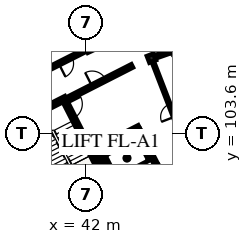
"""IFC4 building model, lengths in metres.
Left out: names, types, materials, properties, quantities, classifications, styles, units other than length and angle.
Written with IfcOpenShell. Run it as: python <this file> out.ifc"""

import sys

from ifc_helpers import new_model, si_unit, direction, frame, frame_2d, origin, origin_2d, place, context, subcontext, project, spatial, rectangle, extrude, element, fill, save


model = new_model("IFC4")
c1 = context("Model", 3, precision=1e-05, world=origin(), true_north=direction((0.0, 1.0)))
c2 = subcontext(c1, "Body", "Model", "MODEL_VIEW")
j1 = project(units=[si_unit("LENGTHUNIT", "METRE"), si_unit("PLANEANGLEUNIT", "RADIAN")], contexts=[c1])
p1 = place(None, origin())
s1 = spatial("IfcSite", under=j1, at=p1, CompositionType="ELEMENT")
p2 = place(p1, origin())
s2 = spatial("IfcBuilding", under=s1, at=p2, CompositionType="ELEMENT")
p3 = place(p2, frame((0.0, 0.0, 42.44)))
s3 = spatial("IfcBuildingStorey", under=s2, at=p3, CompositionType="ELEMENT", Elevation=42.44)
p4 = place(p3, frame((37.773, 104.296, 0.0), z_axis=(0.0, 0.0, 1.0), x_axis=(0.453992276384, -0.891005618941, 0.0)))
e1 = element("IfcWall", 1, at=p4, inside=s3, PredefinedType="SHEAR", context=c2, shape_type="SweptSolid", body=[
    extrude(rectangle(XDim=6.6, YDim=0.28, at=frame_2d((3.3, 0.0))), origin(), (0.0, 0.0, 1.0), 3.11),
])
p5 = place(p3, frame((37.585, 104.357, 0.0), z_axis=(0.0, 0.0, 1.0), x_axis=(0.891020222667, 0.453963613958, 0.0)))
e2 = element("IfcWall", 2, at=p5, inside=s3, PredefinedType="SHEAR", context=c2, shape_type="SweptSolid", body=[
    extrude(rectangle(XDim=3.48, YDim=0.28, at=frame_2d((1.74, 0.0))), origin(), (0.0, 0.0, 1.0), 3.11),
])
p6 = place(p3, frame((40.625, 105.748, 0.0), z_axis=(0.0, 0.0, 1.0), x_axis=(0.453992276384, -0.891005618941, 0.0)))
e3 = element("IfcWall", 3, at=p6, inside=s3, PredefinedType="SHEAR", context=c2, shape_type="SweptSolid", body=[
    extrude(rectangle(XDim=6.6, YDim=0.28, at=frame_2d((3.3, 0.0))), origin(), (0.0, 0.0, 1.0), 3.11),
])
p7 = place(p6, frame((0.22, 0.0, 0.0)))
e4 = element("IfcOpeningElement", 4, at=p7, cuts=e3, PredefinedType="OPENING", context=c2, shape_type="SweptSolid", body=[
    extrude(rectangle(XDim=1.05, YDim=2.15, at=frame_2d((0.525, 1.075))), frame((0.0, 0.15, 0.0), z_axis=(0.0, -1.0, 0.0), x_axis=(1.0, 0.0, 0.0)), (0.0, 0.0, 1.0), 0.3),
])
p8 = place(p3, frame((42.597, 102.561, 0.0), z_axis=(0.0, 0.0, 1.0), x_axis=(0.891001200497, 0.454000947921, 0.0)))
e5 = element("IfcWall", 5, at=p8, inside=s3, PredefinedType="SHEAR", context=c2, shape_type="SweptSolid", body=[
    extrude(rectangle(XDim=3.26, YDim=0.23, at=frame_2d((1.63, 0.0))), origin(), (0.0, 0.0, 1.0), 3.11),
])
p9 = place(p8, frame((0.9, 0.0, 0.0)))
e6 = element("IfcOpeningElement", 6, at=p9, cuts=e5, PredefinedType="OPENING", context=c2, shape_type="SweptSolid", body=[
    extrude(rectangle(XDim=1.1, YDim=2.15, at=frame_2d((0.55, 1.075))), frame((0.0, 0.125, 0.0), z_axis=(0.0, -1.0, 0.0), x_axis=(1.0, 0.0, 0.0)), (0.0, 0.0, 1.0), 0.25),
])
for number, where, z_axis, x_axis in (
    (7, (42.751, 102.511, 0.0), (0.0, 0.0, 1.0), (0.454, -0.891, 0.0)),
    (8, (45.451, 103.886, 0.0), (0.0, 0.0, 1.0), (0.454, -0.891, 0.0)),
):
    element("IfcWall", number, at=place(p3, frame(where, z_axis=z_axis, x_axis=x_axis)), inside=s3, PredefinedType="SHEAR", context=c2, shape_type="SweptSolid", body=[
        extrude(rectangle(XDim=2.7, YDim=0.23, at=frame_2d((1.35, 0.0))), origin(), (0.0, 0.0, 1.0), 3.11),
    ])
for number, where, z_axis, x_axis in (
    (9, (46.325, 108.57, 0.0), (0.0, 0.0, 1.0), (-0.36, 0.933, 0.0)),
    (10, (42.252, 109.23, 0.0), (0.0, 0.0, 1.0), (-0.421, 0.907, 0.0)),
):
    element("IfcColumn", number, at=place(p3, frame(where, z_axis=z_axis, x_axis=x_axis)), inside=s3, PredefinedType="COLUMN", context=c2, shape_type="SweptSolid", body=[
        extrude(rectangle(XDim=0.45, YDim=0.45, at=origin_2d()), origin(), (0.0, 0.0, 1.0), 3.12),
    ])
p10 = place(p3, frame((40.682, 105.834, 0.0), z_axis=(0.0, 0.0, 1.0), x_axis=(0.891003372311, 0.453996685595, 0.0)))
e11 = element("IfcWall", 11, at=p10, inside=s3, PredefinedType="PARTITIONING", context=c2, shape_type="SweptSolid", body=[
    extrude(rectangle(XDim=4.9, YDim=0.22, at=frame_2d((2.45, 0.0))), origin(), (0.0, 0.0, 1.0), 2.34),
])
p11 = place(p10, frame((1.95, 0.0, 0.0)))
e12 = element("IfcOpeningElement", 12, at=p11, cuts=e11, PredefinedType="OPENING", context=c2, shape_type="SweptSolid", body=[
    extrude(rectangle(XDim=1.0, YDim=2.15, at=frame_2d((0.5, 1.075))), frame((0.0, 0.12, 0.0), z_axis=(0.0, -1.0, 0.0), x_axis=(1.0, 0.0, 0.0)), (0.0, 0.0, 1.0), 0.24),
])
p12 = place(p3, frame((49.222, 109.58, 0.0), z_axis=(0.0, 0.0, 1.0), x_axis=(-0.944265123647, -0.329185929627, 0.0)))
e13 = element("IfcWall", 13, at=p12, inside=s3, PredefinedType="PARTITIONING", context=c2, shape_type="SweptSolid", body=[
    extrude(rectangle(XDim=2.718, YDim=0.205, at=frame_2d((1.359, 0.0))), origin(), (0.0, 0.0, 1.0), 2.37),
])
p13 = place(p12, frame((0.894, 0.0, 0.0)))
e14 = element("IfcOpeningElement", 14, at=p13, cuts=e13, PredefinedType="OPENING", context=c2, shape_type="SweptSolid", body=[
    extrude(rectangle(XDim=0.93, YDim=2.12, at=frame_2d((0.465, 1.06))), frame((0.0, 0.113, 0.0), z_axis=(0.0, -1.0, 0.0), x_axis=(1.0, 0.0, 0.0)), (0.0, 0.0, 1.0), 0.225),
])
p14 = place(p3, frame((48.846, 102.04, 0.0), z_axis=(0.0, 0.0, 1.0), x_axis=(-0.360183473608, 0.932881485152, 0.0)))
e15 = element("IfcWall", 15, at=p14, inside=s3, PredefinedType="PARTITIONING", context=c2, shape_type="SweptSolid", body=[
    extrude(rectangle(XDim=6.6, YDim=0.125, at=frame_2d((3.3, 0.0))), origin(), (0.0, 0.0, 1.0), 2.37),
])
p15 = place(p14, frame((2.855, 0.0, 0.0)))
e16 = element("IfcOpeningElement", 16, at=p15, cuts=e15, PredefinedType="OPENING", context=c2, shape_type="SweptSolid", body=[
    extrude(rectangle(XDim=0.89, YDim=2.1, at=frame_2d((0.445, 1.05))), frame((0.0, 0.073, 0.0), z_axis=(0.0, -1.0, 0.0), x_axis=(1.0, 0.0, 0.0)), (0.0, 0.0, 1.0), 0.145),
])
p16 = place(p3, frame((41.94, 109.073, 0.0), z_axis=(0.0, 0.0, 1.0), x_axis=(-0.89273239336, -0.450587254419, 0.0)))
e17 = element("IfcWall", 17, at=p16, inside=s3, PredefinedType="PARTITIONING", context=c2, shape_type="SweptSolid", body=[
    extrude(rectangle(XDim=2.863, YDim=0.205, at=frame_2d((1.432, 0.0))), origin(), (0.0, 0.0, 1.0), 2.37),
])
p17 = place(p16, frame((0.947, 0.0, 0.0)))
e18 = element("IfcOpeningElement", 18, at=p17, cuts=e17, PredefinedType="OPENING", context=c2, shape_type="SweptSolid", body=[
    extrude(rectangle(XDim=0.97, YDim=2.15, at=frame_2d((0.485, 1.075))), frame((0.0, 0.113, 0.0), z_axis=(0.0, -1.0, 0.0), x_axis=(1.0, 0.0, 0.0)), (0.0, 0.0, 1.0), 0.225),
])
p18 = place(p7, origin())
e19 = element("IfcDoor", 19, at=p18, inside=s3, OperationType="SINGLE_SWING_LEFT", PredefinedType="DOOR", context=c2, shape_type="SweptSolid", body=[
    extrude(rectangle(XDim=1.05, YDim=2.15, at=frame_2d((0.525, 1.075))), frame((0.0, 0.025, 0.0), z_axis=(0.0, -1.0, 0.0), x_axis=(1.0, 0.0, 0.0)), (0.0, 0.0, 1.0), 0.05),
])
fill(e4, e19)
p19 = place(p9, origin())
e20 = element("IfcDoor", 20, at=p19, inside=s3, OperationType="DOUBLE_DOOR_SLIDING", PredefinedType="DOOR", context=c2, shape_type="SweptSolid", body=[
    extrude(rectangle(XDim=1.1, YDim=2.15, at=frame_2d((0.55, 1.075))), frame((0.0, 0.025, 0.0), z_axis=(0.0, -1.0, 0.0), x_axis=(1.0, 0.0, 0.0)), (0.0, 0.0, 1.0), 0.05),
])
fill(e6, e20)
p20 = place(p11, origin())
e21 = element("IfcDoor", 21, at=p20, inside=s3, OperationType="SINGLE_SWING_LEFT", PredefinedType="DOOR", context=c2, shape_type="SweptSolid", body=[
    extrude(rectangle(XDim=1.0, YDim=2.15, at=frame_2d((0.5, 1.075))), frame((0.0, 0.025, 0.0), z_axis=(0.0, -1.0, 0.0), x_axis=(1.0, 0.0, 0.0)), (0.0, 0.0, 1.0), 0.05),
])
fill(e12, e21)
p21 = place(p15, origin())
e22 = element("IfcDoor", 22, at=p21, inside=s3, OperationType="SINGLE_SWING_LEFT", PredefinedType="DOOR", context=c2, shape_type="SweptSolid", body=[
    extrude(rectangle(XDim=0.89, YDim=2.1, at=frame_2d((0.445, 1.05))), frame((0.0, 0.025, 0.0), z_axis=(0.0, -1.0, 0.0), x_axis=(1.0, 0.0, 0.0)), (0.0, 0.0, 1.0), 0.05),
])
fill(e16, e22)
p22 = place(p17, origin())
e23 = element("IfcDoor", 23, at=p22, inside=s3, OperationType="SINGLE_SWING_RIGHT", PredefinedType="DOOR", context=c2, shape_type="SweptSolid", body=[
    extrude(rectangle(XDim=0.97, YDim=2.15, at=frame_2d((0.485, 1.075))), frame((0.0, 0.025, 0.0), z_axis=(0.0, -1.0, 0.0), x_axis=(1.0, 0.0, 0.0)), (0.0, 0.0, 1.0), 0.05),
])
fill(e18, e23)
save(model, sys.argv[1])
